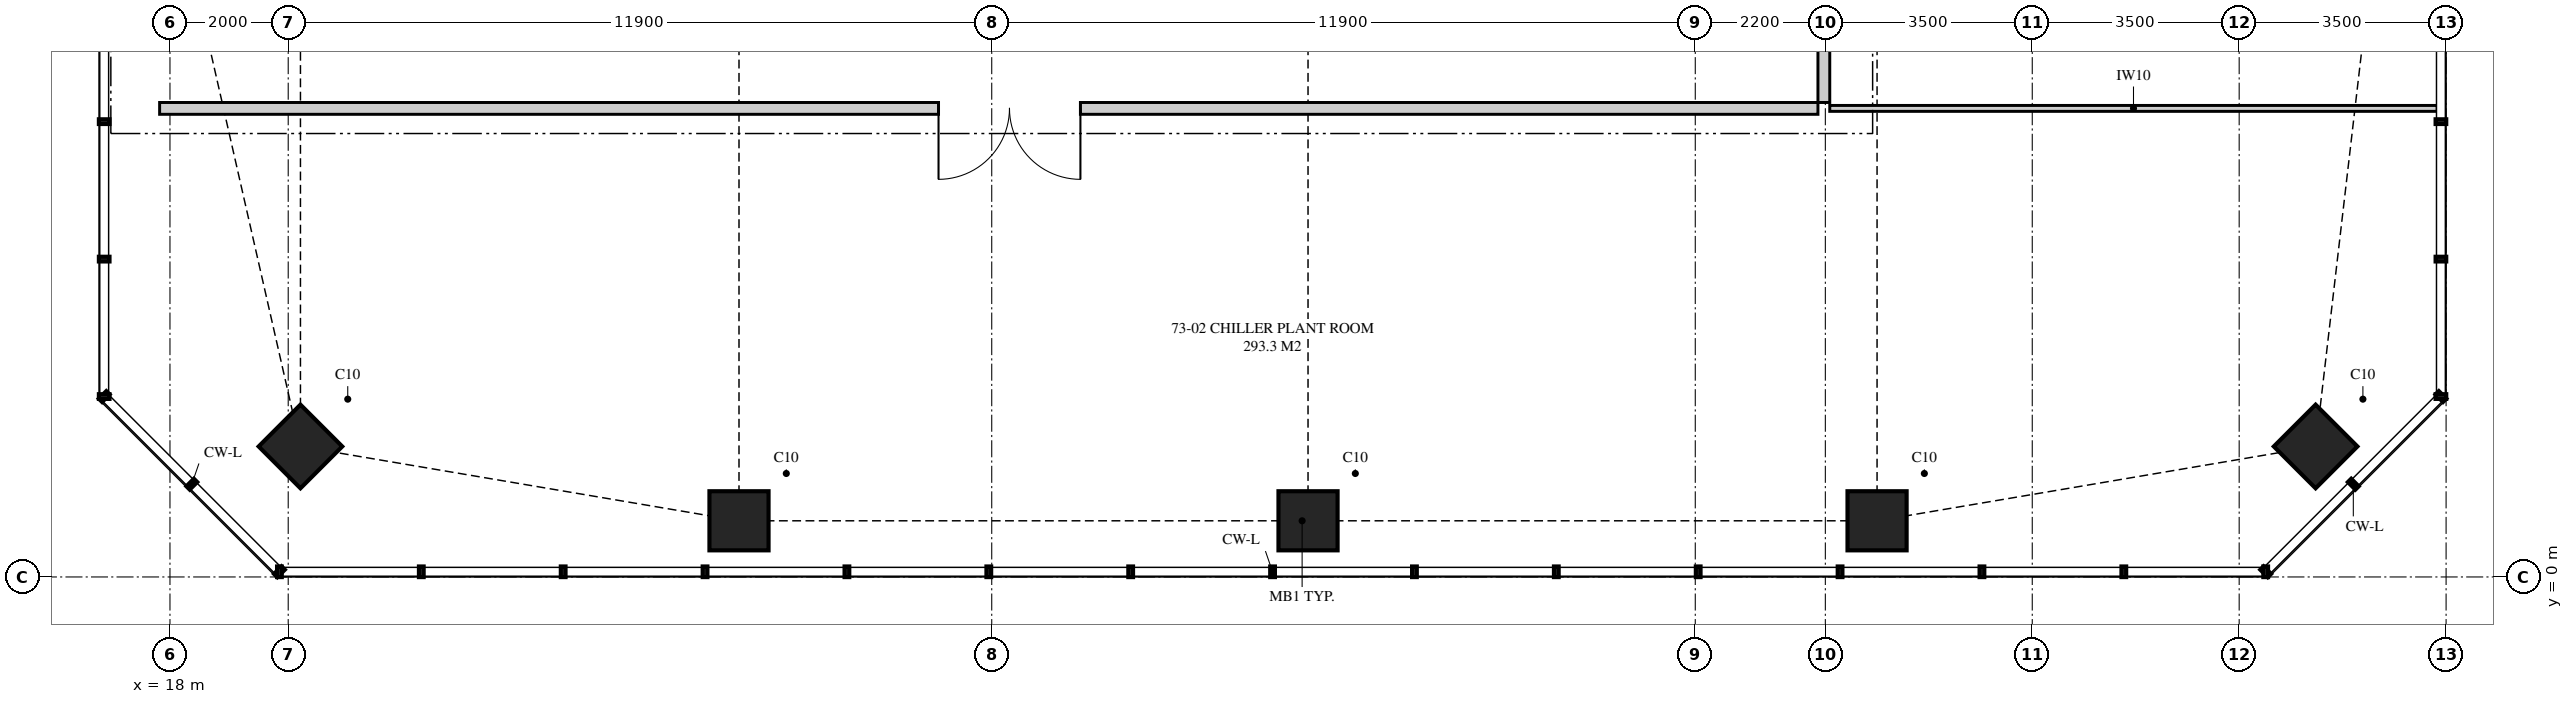
"""IFC4 building model, lengths in metres.
Left out: names, types, materials, properties, quantities, classifications, styles, units other than length and angle.
Written with IfcOpenShell. Run it as: python <this file> out.ifc"""

import sys

from ifc_helpers import new_model, si_unit, direction, frame, frame_2d, origin, origin_2d, place, context, subcontext, project, spatial, polyline, rectangle, outline, extrude, element, fill, save


model = new_model("IFC4")
c1 = context("Model", 3, precision=1e-05, world=origin(), true_north=direction((0.0, 1.0)))
c2 = subcontext(c1, "Body", "Model", "MODEL_VIEW")
j1 = project(units=[si_unit("LENGTHUNIT", "METRE"), si_unit("PLANEANGLEUNIT", "RADIAN")], contexts=[c1])
p1 = place(None, origin())
s1 = spatial("IfcSite", under=j1, at=p1, CompositionType="ELEMENT")
p2 = place(p1, origin())
s2 = spatial("IfcBuilding", under=s1, at=p2, CompositionType="ELEMENT")
p3 = place(p2, frame((0.0, 0.0, 267.75)))
s3 = spatial("IfcBuildingStorey", under=s2, at=p3, CompositionType="ELEMENT", Elevation=267.75)
for number, where, z_axis, x_axis in (
    (1, (20.207, 2.207, 0.0), (0.0, 0.0, 1.0), (0.707, 0.707, 0.0)),
    (2, (27.625, 0.95, 0.0), (0.0, 0.0, 1.0), (1.0, 0.0, 0.0)),
    (3, (37.25, 0.95, 0.0), (0.0, 0.0, 1.0), (1.0, 0.0, 0.0)),
    (4, (46.875, 0.95, 0.0), (0.0, 0.0, 1.0), (1.0, 0.0, 0.0)),
    (5, (54.293, 2.207, 0.0), (0.0, 0.0, 1.0), (0.707, 0.707, 0.0)),
):
    element("IfcColumn", number, at=place(p3, frame(where, z_axis=z_axis, x_axis=x_axis)), inside=s3, PredefinedType="COLUMN", context=c2, shape_type="SweptSolid", body=[
        extrude(rectangle(XDim=1.0, YDim=1.0, at=origin_2d()), origin(), (0.0, 0.0, 1.0), 5.0),
    ])
p4 = place(p3, frame((17.825, 7.925, 0.0), z_axis=(0.0, 0.0, 1.0), x_axis=(1.0, 0.0, 0.0)))
e6 = element("IfcWall", 6, at=p4, inside=s3, PredefinedType="PARTITIONING", context=c2, shape_type="SweptSolid", body=[
    extrude(outline(polyline([(0.0, 0.0), (28.05, 0.0), (28.05, 4.72), (28.05, 4.12), (27.74, 4.12), (27.74, 4.72), (20.735, 4.72), (20.735, 4.12), (18.115, 4.12), (18.115, 4.72), (11.11, 4.72), (11.11, 4.12), (8.49, 4.12), (8.49, 4.72), (3.692, 4.72), (3.692, 4.12), (2.014, 4.12), (2.014, 3.5), (0.147, 3.5), (0.147, 4.72), (0.0, 4.72), (0.0, 0.0)])), frame((0.0, 0.1, 0.0), z_axis=(0.0, -1.0, 0.0), x_axis=(1.0, 0.0, 0.0)), (0.0, 0.0, 1.0), 0.2),
])
p5 = place(p4, frame((13.175, 0.0, 0.0)))
e7 = element("IfcOpeningElement", 7, at=p5, cuts=e6, PredefinedType="OPENING", context=c2, shape_type="SweptSolid", body=[
    extrude(rectangle(XDim=2.4, YDim=2.4, at=frame_2d((1.2, 1.2))), frame((0.0, 0.11, 0.0), z_axis=(0.0, -1.0, 0.0), x_axis=(1.0, 0.0, 0.0)), (0.0, 0.0, 1.0), 0.22),
])
p6 = place(p3, frame((45.975, 8.025, 0.0), z_axis=(0.0, 0.0, 1.0), x_axis=(0.0, 1.0, 0.0)))
e8 = element("IfcWall", 8, at=p6, inside=s3, PredefinedType="PARTITIONING", context=c2, shape_type="SweptSolid", body=[
    extrude(outline(polyline([(0.0, 0.0), (1.8, 0.0), (1.8, 4.72), (1.8, 4.12), (0.0, 4.12), (0.0, 4.72), (0.0, 0.0)])), frame((0.0, 0.1, 0.0), z_axis=(0.0, -1.0, 0.0), x_axis=(1.0, 0.0, 0.0)), (0.0, 0.0, 1.0), 0.2),
])
p7 = place(p3, frame((46.075, 7.925, 0.0), z_axis=(0.0, 0.0, 1.0), x_axis=(1.0, 0.0, 0.0)))
e9 = element("IfcWall", 9, at=p7, inside=s3, PredefinedType="PARTITIONING", context=c2, shape_type="SweptSolid", body=[
    extrude(outline(polyline([(0.0, 0.0), (10.275, 0.0), (10.275, 4.72), (9.75, 4.72), (9.75, 3.5), (8.018, 3.5), (8.018, 4.72), (2.06, 4.72), (2.06, 4.12), (0.0, 4.12), (0.0, 4.72), (0.0, 0.0)])), frame((0.0, 0.05, 0.0), z_axis=(0.0, -1.0, 0.0), x_axis=(1.0, 0.0, 0.0)), (0.0, 0.0, 1.0), 0.1),
])
p8 = place(p5, frame((2.4, 0.0, 0.0), z_axis=(0.0, 0.0, 1.0), x_axis=(-1.0, 0.0, 0.0)))
e10 = element("IfcDoor", 10, at=p8, inside=s3, OperationType="DOUBLE_DOOR_SINGLE_SWING", PredefinedType="DOOR", context=c2, shape_type="SweptSolid", body=[
    extrude(rectangle(XDim=2.4, YDim=2.4, at=frame_2d((1.2, 1.2))), frame((0.0, 0.025, 0.0), z_axis=(0.0, -1.0, 0.0), x_axis=(1.0, 0.0, 0.0)), (0.0, 0.0, 1.0), 0.05),
])
fill(e7, e10)
save(model, sys.argv[1])
